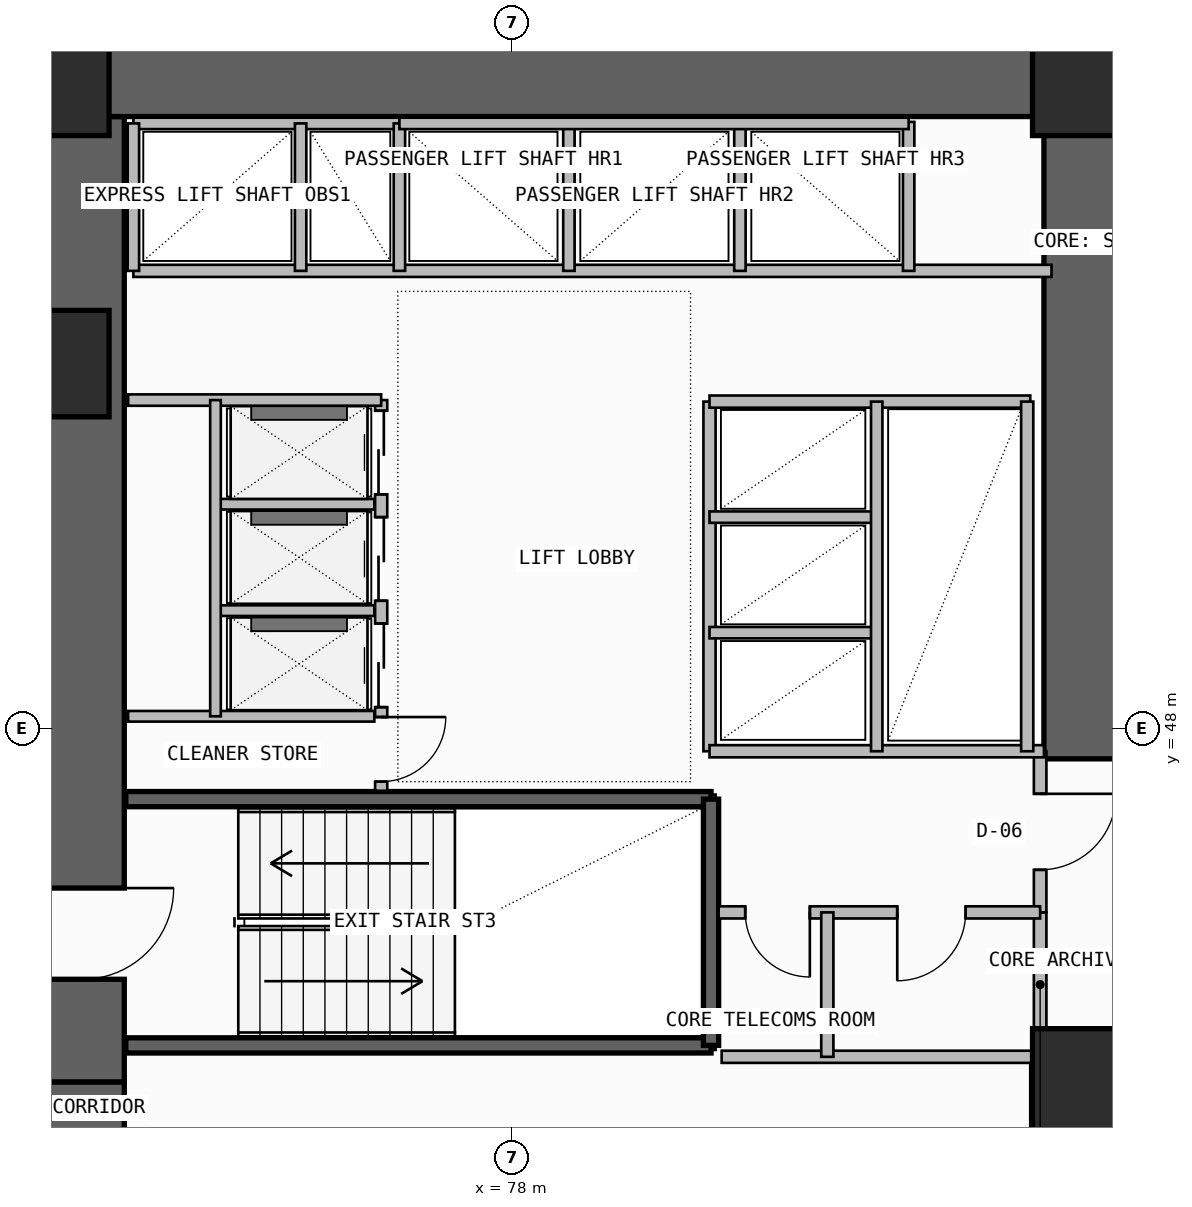
"""IFC4 building model, lengths in metres.
Left out: names, types, materials, properties, quantities, classifications, styles, units other than length and angle.
Written with IfcOpenShell. Run it as: python <this file> out.ifc"""

import sys

from ifc_helpers import new_model, si_unit, direction, frame, frame_2d, origin, origin_2d, place, context, subcontext, project, spatial, rectangle, extrude, element, fill, save


model = new_model("IFC4")
c1 = context("Model", 3, precision=1e-05, world=origin(), true_north=direction((0.0, 1.0)))
c2 = subcontext(c1, "Body", "Model", "MODEL_VIEW")
j1 = project(units=[si_unit("LENGTHUNIT", "METRE"), si_unit("PLANEANGLEUNIT", "RADIAN")], contexts=[c1])
p1 = place(None, origin())
s1 = spatial("IfcSite", under=j1, at=p1, CompositionType="ELEMENT")
p2 = place(p1, origin())
s2 = spatial("IfcBuilding", under=s1, at=p2, CompositionType="ELEMENT")
p3 = place(p2, frame((0.0, 0.0, 74.1)))
s3 = spatial("IfcBuildingStorey", under=s2, at=p3, CompositionType="ELEMENT", Elevation=74.1)
p4 = place(p3, frame((72.35, 35.5, -0.26), z_axis=(0.0, 0.0, 1.0), x_axis=(0.0, 1.0, 0.0)))
e1 = element("IfcWall", 1, at=p4, inside=s3, PredefinedType="SHEAR", context=c2, shape_type="SweptSolid", body=[
    extrude(rectangle(XDim=7.85, YDim=1.1, at=frame_2d((3.925, 0.0))), origin(), (0.0, 0.0, 1.0), 3.6),
])
p5 = place(p4, frame((1.45, 0.0, 0.26)))
e2 = element("IfcOpeningElement", 2, at=p5, cuts=e1, PredefinedType="OPENING", context=c2, shape_type="SweptSolid", body=[
    extrude(rectangle(XDim=1.2, YDim=2.2, at=frame_2d((0.6, 1.1))), frame((0.0, 0.56, 0.0), z_axis=(0.0, -1.0, 0.0), x_axis=(1.0, 0.0, 0.0)), (0.0, 0.0, 1.0), 1.12),
])
p6 = place(p3, frame((72.35, 43.35, -0.26), z_axis=(0.0, 0.0, 1.0), x_axis=(0.0, 1.0, 0.0)))
e3 = element("IfcWall", 3, at=p6, inside=s3, PredefinedType="SHEAR", context=c2, shape_type="SweptSolid", body=[
    extrude(rectangle(XDim=12.7, YDim=1.1, at=frame_2d((6.35, 0.0))), origin(), (0.0, 0.0, 1.0), 3.6),
])
p7 = place(p6, frame((1.35, 0.0, 0.26)))
e4 = element("IfcOpeningElement", 4, at=p7, cuts=e3, PredefinedType="OPENING", context=c2, shape_type="SweptSolid", body=[
    extrude(rectangle(XDim=1.2, YDim=2.2, at=frame_2d((0.6, 1.1))), frame((0.0, 0.56, 0.0), z_axis=(0.0, -1.0, 0.0), x_axis=(1.0, 0.0, 0.0)), (0.0, 0.0, 1.0), 1.12),
])
p8 = place(p3, frame((71.8, 56.6, -0.26), z_axis=(0.0, 0.0, 1.0), x_axis=(1.0, 0.0, 0.0)))
e5 = element("IfcWall", 5, at=p8, inside=s3, PredefinedType="SHEAR", context=c2, shape_type="SweptSolid", body=[
    extrude(rectangle(XDim=14.3, YDim=1.1, at=frame_2d((7.15, 0.0))), origin(), (0.0, 0.0, 1.0), 3.6),
])
p9 = place(p3, frame((85.55, 47.6, -0.26), z_axis=(0.0, 0.0, 1.0), x_axis=(0.0, 1.0, 0.0)))
e6 = element("IfcWall", 6, at=p9, inside=s3, PredefinedType="SHEAR", context=c2, shape_type="SweptSolid", body=[
    extrude(rectangle(XDim=8.45, YDim=1.1, at=frame_2d((4.225, 0.0))), origin(), (0.0, 0.0, 1.0), 3.6),
])
for number, where, z_axis, x_axis in (
    (7, (85.55, 43.35, 0.0), (0.0, 0.0, 1.0), (1.0, 0.0, 0.0)),
    (8, (72.0, 52.8, 0.0), (0.0, 0.0, 1.0), (1.0, 0.0, 0.0)),
    (9, (72.0, 56.5, 0.0), (0.0, 0.0, 1.0), (1.0, 0.0, 0.0)),
    (10, (85.55, 56.5, 0.0), (0.0, 0.0, 1.0), (1.0, 0.0, 0.0)),
):
    element("IfcColumn", number, at=place(p3, frame(where, z_axis=z_axis, x_axis=x_axis)), inside=s3, PredefinedType="COLUMN", context=c2, shape_type="SweptSolid", body=[
        extrude(rectangle(XDim=1.4, YDim=1.4, at=origin_2d()), origin(), (0.0, 0.0, 1.0), 3.6),
    ])
p10 = place(p3, frame((84.92, 38.85, 0.0), z_axis=(0.0, 0.0, 1.0), x_axis=(0.0, 1.0, 0.0)))
e11 = element("IfcWall", 11, at=p10, inside=s3, PredefinedType="SOLIDWALL", context=c2, shape_type="SweptSolid", body=[
    extrude(rectangle(XDim=4.83, YDim=0.2, at=frame_2d((2.415, 0.0))), origin(), (0.0, 0.0, 1.0), 3.34),
])
p11 = place(p10, frame((1.25, 0.0, 0.0)))
e12 = element("IfcOpeningElement", 12, at=p11, cuts=e11, PredefinedType="OPENING", context=c2, shape_type="SweptSolid", body=[
    extrude(rectangle(XDim=1.1, YDim=2.2, at=frame_2d((0.55, 1.1))), frame((0.0, 0.11, 0.0), z_axis=(0.0, -1.0, 0.0), x_axis=(1.0, 0.0, 0.0)), (0.0, 0.0, 1.0), 0.22),
])
for number, where, z_axis, x_axis in (
    (13, (72.92, 43.83, -0.26), (0.0, 0.0, 1.0), (1.0, 0.0, 0.0)),
    (14, (72.92, 47.07, -0.26), (0.0, 0.0, 1.0), (1.0, 0.0, 0.0)),
):
    element("IfcWall", number, at=place(p3, frame(where, z_axis=z_axis, x_axis=x_axis)), inside=s3, PredefinedType="SOLIDWALL", context=c2, shape_type="SweptSolid", body=[
        extrude(rectangle(XDim=7.7, YDim=0.2, at=frame_2d((3.85, 0.0))), origin(), (0.0, 0.0, 1.0), 3.6),
    ])
p12 = place(p3, frame((80.62, 43.83, -0.26), z_axis=(0.0, 0.0, 1.0), x_axis=(0.0, 1.0, 0.0)))
e15 = element("IfcWall", 15, at=p12, inside=s3, PredefinedType="SOLIDWALL", context=c2, shape_type="SweptSolid", body=[
    extrude(rectangle(XDim=3.24, YDim=0.2, at=frame_2d((1.62, 0.0))), origin(), (0.0, 0.0, 1.0), 3.6),
])
p13 = place(p3, frame((84.95, 43.68, 0.0), z_axis=(0.0, 0.0, 1.0), x_axis=(0.0, 1.0, 0.0)))
e16 = element("IfcWall", 16, at=p13, inside=s3, PredefinedType="PLUMBINGWALL", context=c2, shape_type="SweptSolid", body=[
    extrude(rectangle(XDim=1.9, YDim=0.165, at=frame_2d((0.95, 0.0))), origin(), (0.0, 0.0, 1.0), 3.34),
])
p14 = place(p3, frame((84.95, 45.58, 0.0), z_axis=(0.0, 0.0, 1.0), x_axis=(0.0, 1.0, 0.0)))
e17 = element("IfcWall", 17, at=p14, inside=s3, PredefinedType="PARTITIONING", context=c2, shape_type="SweptSolid", body=[
    extrude(rectangle(XDim=2.12, YDim=0.165, at=frame_2d((1.06, 0.0))), origin(), (0.0, 0.0, 1.0), 3.34),
])
p15 = place(p14, frame((0.56, 0.0, 0.0)))
e18 = element("IfcOpeningElement", 18, at=p15, cuts=e17, PredefinedType="OPENING", context=c2, shape_type="SweptSolid", body=[
    extrude(rectangle(XDim=1.0, YDim=2.2, at=frame_2d((0.5, 1.1))), frame((0.0, 0.093, 0.0), z_axis=(0.0, -1.0, 0.0), x_axis=(1.0, 0.0, 0.0)), (0.0, 0.0, 1.0), 0.185),
])
p16 = place(p3, frame((80.72, 45.58, 0.0), z_axis=(0.0, 0.0, 1.0), x_axis=(1.0, 0.0, 0.0)))
e19 = element("IfcWall", 19, at=p16, inside=s3, PredefinedType="PLUMBINGWALL", context=c2, shape_type="SweptSolid", body=[
    extrude(rectangle(XDim=4.23, YDim=0.16, at=frame_2d((2.115, 0.0))), origin(), (0.0, 0.0, 1.0), 3.34),
])
p17 = place(p16, frame((0.35, 0.0, 0.0)))
e20 = element("IfcOpeningElement", 20, at=p17, cuts=e19, PredefinedType="OPENING", context=c2, shape_type="SweptSolid", body=[
    extrude(rectangle(XDim=0.85, YDim=2.05, at=frame_2d((0.425, 1.025))), frame((0.0, 0.09, 0.0), z_axis=(0.0, -1.0, 0.0), x_axis=(1.0, 0.0, 0.0)), (0.0, 0.0, 1.0), 0.18),
])
p18 = place(p16, frame((2.35, 0.0, 0.0)))
e21 = element("IfcOpeningElement", 21, at=p18, cuts=e19, PredefinedType="OPENING", context=c2, shape_type="SweptSolid", body=[
    extrude(rectangle(XDim=0.9, YDim=2.1, at=frame_2d((0.45, 1.05))), frame((0.0, 0.09, 0.0), z_axis=(0.0, -1.0, 0.0), x_axis=(1.0, 0.0, 0.0)), (0.0, 0.0, 1.0), 0.18),
])
p19 = place(p3, frame((80.76, 43.68, 0.0), z_axis=(0.0, 0.0, 1.0), x_axis=(1.0, 0.0, 0.0)))
e22 = element("IfcWall", 22, at=p19, inside=s3, PredefinedType="PLUMBINGWALL", context=c2, shape_type="SweptSolid", body=[
    extrude(rectangle(XDim=4.19, YDim=0.16, at=frame_2d((2.095, 0.0))), origin(), (0.0, 0.0, 1.0), 3.34),
])
p20 = place(p3, frame((82.15, 43.68, 0.0), z_axis=(0.0, 0.0, 1.0), x_axis=(0.0, 1.0, 0.0)))
e23 = element("IfcWall", 23, at=p20, inside=s3, PredefinedType="PLUMBINGWALL", context=c2, shape_type="SweptSolid", body=[
    extrude(rectangle(XDim=1.9, YDim=0.16, at=frame_2d((0.95, 0.0))), origin(), (0.0, 0.0, 1.0), 3.34),
])
p21 = place(p3, frame((76.28, 47.18, 0.0), z_axis=(0.0, 0.0, 1.0), x_axis=(0.0, 1.0, 0.0)))
e24 = element("IfcWall", 24, at=p21, inside=s3, PredefinedType="SOLIDWALL", context=c2, shape_type="SweptSolid", body=[
    extrude(rectangle(XDim=5.14, YDim=0.16, at=frame_2d((2.57, 0.0))), origin(), (0.0, 0.0, 1.0), 3.34),
])
p22 = place(p21, frame((1.1, 0.0, 0.0)))
e25 = element("IfcOpeningElement", 25, at=p22, cuts=e24, PredefinedType="OPENING", context=c2, shape_type="SweptSolid", body=[
    extrude(rectangle(XDim=1.1, YDim=2.25, at=frame_2d((0.55, 1.125))), frame((0.0, 0.09, 0.0), z_axis=(0.0, -1.0, 0.0), x_axis=(1.0, 0.0, 0.0)), (0.0, 0.0, 1.0), 0.18),
])
p23 = place(p21, frame((2.5, 0.0, 0.0)))
e26 = element("IfcOpeningElement", 26, at=p23, cuts=e24, PredefinedType="OPENING", context=c2, shape_type="SweptSolid", body=[
    extrude(rectangle(XDim=1.1, YDim=2.25, at=frame_2d((0.55, 1.125))), frame((0.0, 0.09, 0.0), z_axis=(0.0, -1.0, 0.0), x_axis=(1.0, 0.0, 0.0)), (0.0, 0.0, 1.0), 0.18),
])
p24 = place(p21, frame((3.9, 0.0, 0.0)))
e27 = element("IfcOpeningElement", 27, at=p24, cuts=e24, PredefinedType="OPENING", context=c2, shape_type="SweptSolid", body=[
    extrude(rectangle(XDim=1.1, YDim=2.25, at=frame_2d((0.55, 1.125))), frame((0.0, 0.09, 0.0), z_axis=(0.0, -1.0, 0.0), x_axis=(1.0, 0.0, 0.0)), (0.0, 0.0, 1.0), 0.18),
])
p25 = place(p21, frame((0.12, 0.0, 0.0)))
e28 = element("IfcOpeningElement", 28, at=p25, cuts=e24, PredefinedType="OPENING", context=c2, shape_type="SweptSolid", body=[
    extrude(rectangle(XDim=0.85, YDim=2.05, at=frame_2d((0.425, 1.025))), frame((0.0, 0.09, 0.0), z_axis=(0.0, -1.0, 0.0), x_axis=(1.0, 0.0, 0.0)), (0.0, 0.0, 1.0), 0.18),
])
p26 = place(p3, frame((72.95, 52.32, 0.0), z_axis=(0.0, 0.0, 1.0), x_axis=(1.0, 0.0, 0.0)))
e29 = element("IfcWall", 29, at=p26, inside=s3, PredefinedType="SOLIDWALL", context=c2, shape_type="SweptSolid", body=[
    extrude(rectangle(XDim=3.33, YDim=0.15, at=frame_2d((1.665, 0.0))), origin(), (0.0, 0.0, 1.0), 3.34),
])
p27 = place(p3, frame((72.95, 48.16, 0.0), z_axis=(0.0, 0.0, 1.0), x_axis=(1.0, 0.0, 0.0)))
e30 = element("IfcWall", 30, at=p27, inside=s3, PredefinedType="PLUMBINGWALL", context=c2, shape_type="SweptSolid", body=[
    extrude(rectangle(XDim=3.24, YDim=0.14, at=frame_2d((1.62, 0.0))), origin(), (0.0, 0.0, 1.0), 3.34),
])
for number, where, z_axis, x_axis in (
    (31, (74.15, 49.55, 0.0), (0.0, 0.0, 1.0), (1.0, 0.0, 0.0)),
    (32, (74.15, 50.95, 0.0), (0.0, 0.0, 1.0), (1.0, 0.0, 0.0)),
):
    element("IfcWall", number, at=place(p3, frame(where, z_axis=z_axis, x_axis=x_axis)), inside=s3, PredefinedType="PLUMBINGWALL", context=c2, shape_type="SweptSolid", body=[
        extrude(rectangle(XDim=2.04, YDim=0.14, at=frame_2d((1.02, 0.0))), origin(), (0.0, 0.0, 1.0), 3.34),
    ])
p28 = place(p3, frame((74.1, 48.16, 0.0), z_axis=(0.0, 0.0, 1.0), x_axis=(0.0, 1.0, 0.0)))
e33 = element("IfcWall", 33, at=p28, inside=s3, PredefinedType="PLUMBINGWALL", context=c2, shape_type="SweptSolid", body=[
    extrude(rectangle(XDim=4.16, YDim=0.14, at=frame_2d((2.08, 0.0))), origin(), (0.0, 0.0, 1.0), 3.34),
])
p29 = place(p3, frame((80.6, 47.7, 0.0), z_axis=(0.0, 0.0, 1.0), x_axis=(0.0, 1.0, 0.0)))
e34 = element("IfcWall", 34, at=p29, inside=s3, PredefinedType="SOLIDWALL", context=c2, shape_type="SweptSolid", body=[
    extrude(rectangle(XDim=4.6, YDim=0.16, at=frame_2d((2.3, 0.0))), origin(), (0.0, 0.0, 1.0), 3.34),
])
p30 = place(p3, frame((80.6, 47.7, 0.0), z_axis=(0.0, 0.0, 1.0), x_axis=(1.0, 0.0, 0.0)))
e35 = element("IfcWall", 35, at=p30, inside=s3, PredefinedType="SOLIDWALL", context=c2, shape_type="SweptSolid", body=[
    extrude(rectangle(XDim=4.4, YDim=0.16, at=frame_2d((2.2, 0.0))), origin(), (0.0, 0.0, 1.0), 3.34),
])
p31 = place(p3, frame((80.6, 52.3, 0.0), z_axis=(0.0, 0.0, 1.0), x_axis=(1.0, 0.0, 0.0)))
e36 = element("IfcWall", 36, at=p31, inside=s3, PredefinedType="SOLIDWALL", context=c2, shape_type="SweptSolid", body=[
    extrude(rectangle(XDim=4.22, YDim=0.16, at=frame_2d((2.11, 0.0))), origin(), (0.0, 0.0, 1.0), 3.34),
])
for number, where, z_axis, x_axis in (
    (37, (80.6, 49.26, 0.0), (0.0, 0.0, 1.0), (1.0, 0.0, 0.0)),
    (38, (80.6, 50.78, 0.0), (0.0, 0.0, 1.0), (1.0, 0.0, 0.0)),
):
    element("IfcWall", number, at=place(p3, frame(where, z_axis=z_axis, x_axis=x_axis)), inside=s3, PredefinedType="PLUMBINGWALL", context=c2, shape_type="SweptSolid", body=[
        extrude(rectangle(XDim=2.2, YDim=0.15, at=frame_2d((1.1, 0.0))), origin(), (0.0, 0.0, 1.0), 3.34),
    ])
p32 = place(p3, frame((82.8, 47.7, 0.0), z_axis=(0.0, 0.0, 1.0), x_axis=(0.0, 1.0, 0.0)))
e39 = element("IfcWall", 39, at=p32, inside=s3, PredefinedType="PLUMBINGWALL", context=c2, shape_type="SweptSolid", body=[
    extrude(rectangle(XDim=4.6, YDim=0.15, at=frame_2d((2.3, 0.0))), origin(), (0.0, 0.0, 1.0), 3.34),
])
p33 = place(p3, frame((84.78, 47.7, 0.0), z_axis=(0.0, 0.0, 1.0), x_axis=(0.0, 1.0, 0.0)))
e40 = element("IfcWall", 40, at=p33, inside=s3, PredefinedType="SOLIDWALL", context=c2, shape_type="SweptSolid", body=[
    extrude(rectangle(XDim=4.6, YDim=0.16, at=frame_2d((2.3, 0.0))), origin(), (0.0, 0.0, 1.0), 3.34),
])
p34 = place(p3, frame((73.02, 54.02, 0.0), z_axis=(0.0, 0.0, 1.0), x_axis=(1.0, 0.0, 0.0)))
e41 = element("IfcWall", 41, at=p34, inside=s3, PredefinedType="SOLIDWALL", context=c2, shape_type="SweptSolid", body=[
    extrude(rectangle(XDim=12.08, YDim=0.16, at=frame_2d((6.04, 0.0))), origin(), (0.0, 0.0, 1.0), 3.34),
])
p35 = place(p3, frame((73.02, 55.96, 0.0), z_axis=(0.0, 0.0, 1.0), x_axis=(1.0, 0.0, 0.0)))
e42 = element("IfcWall", 42, at=p35, inside=s3, PredefinedType="SOLIDWALL", context=c2, shape_type="SweptSolid", body=[
    extrude(rectangle(XDim=3.5, YDim=0.15, at=frame_2d((1.75, 0.0))), origin(), (0.0, 0.0, 1.0), 3.34),
])
p36 = place(p3, frame((73.02, 54.02, 0.0), z_axis=(0.0, 0.0, 1.0), x_axis=(0.0, 1.0, 0.0)))
e43 = element("IfcWall", 43, at=p36, inside=s3, PredefinedType="PLUMBINGWALL", context=c2, shape_type="SweptSolid", body=[
    extrude(rectangle(XDim=1.94, YDim=0.15, at=frame_2d((0.97, 0.0))), origin(), (0.0, 0.0, 1.0), 3.34),
])
p37 = place(p3, frame((76.52, 54.02, 0.0), z_axis=(0.0, 0.0, 1.0), x_axis=(0.0, 1.0, 0.0)))
e44 = element("IfcWall", 44, at=p37, inside=s3, PredefinedType="SOLIDWALL", context=c2, shape_type="SweptSolid", body=[
    extrude(rectangle(XDim=1.94, YDim=0.15, at=frame_2d((0.97, 0.0))), origin(), (0.0, 0.0, 1.0), 3.34),
])
p38 = place(p3, frame((75.22, 54.02, 0.0), z_axis=(0.0, 0.0, 1.0), x_axis=(0.0, 1.0, 0.0)))
e45 = element("IfcWall", 45, at=p38, inside=s3, PredefinedType="PLUMBINGWALL", context=c2, shape_type="SweptSolid", body=[
    extrude(rectangle(XDim=1.94, YDim=0.15, at=frame_2d((0.97, 0.0))), origin(), (0.0, 0.0, 1.0), 3.34),
])
for number, where, z_axis, x_axis in (
    (46, (78.75, 54.02, 0.0), (0.0, 0.0, 1.0), (0.0, 1.0, 0.0)),
    (47, (81.0, 54.02, 0.0), (0.0, 0.0, 1.0), (0.0, 1.0, 0.0)),
):
    element("IfcWall", number, at=place(p3, frame(where, z_axis=z_axis, x_axis=x_axis)), inside=s3, PredefinedType="PLUMBINGWALL", context=c2, shape_type="SweptSolid", body=[
        extrude(rectangle(XDim=1.96, YDim=0.15, at=frame_2d((0.98, 0.0))), origin(), (0.0, 0.0, 1.0), 3.34),
    ])
p39 = place(p3, frame((83.22, 54.02, 0.0), z_axis=(0.0, 0.0, 1.0), x_axis=(0.0, 1.0, 0.0)))
e48 = element("IfcWall", 48, at=p39, inside=s3, PredefinedType="SOLIDWALL", context=c2, shape_type="SweptSolid", body=[
    extrude(rectangle(XDim=1.96, YDim=0.15, at=frame_2d((0.98, 0.0))), origin(), (0.0, 0.0, 1.0), 3.34),
])
p40 = place(p3, frame((76.52, 55.96, 0.0), z_axis=(0.0, 0.0, 1.0), x_axis=(1.0, 0.0, 0.0)))
e49 = element("IfcWall", 49, at=p40, inside=s3, PredefinedType="SOLIDWALL", context=c2, shape_type="SweptSolid", body=[
    extrude(rectangle(XDim=6.7, YDim=0.15, at=frame_2d((3.35, 0.0))), origin(), (0.0, 0.0, 1.0), 3.34),
])
p41 = place(p7, frame((1.2, 0.0, 0.0), z_axis=(0.0, 0.0, 1.0), x_axis=(-1.0, 0.0, 0.0)))
e50 = element("IfcDoor", 50, at=p41, inside=s3, OperationType="SINGLE_SWING_LEFT", PredefinedType="USERDEFINED", context=c2, shape_type="SweptSolid", body=[
    extrude(rectangle(XDim=1.2, YDim=2.2, at=frame_2d((0.6, 1.1))), frame((0.0, 0.025, 0.0), z_axis=(0.0, -1.0, 0.0), x_axis=(1.0, 0.0, 0.0)), (0.0, 0.0, 1.0), 0.05),
])
fill(e4, e50)
p42 = place(p15, frame((1.0, 0.0, 0.0), z_axis=(0.0, 0.0, 1.0), x_axis=(-1.0, 0.0, 0.0)))
e51 = element("IfcDoor", 51, at=p42, inside=s3, OperationType="SINGLE_SWING_LEFT", PredefinedType="DOOR", context=c2, shape_type="SweptSolid", body=[
    extrude(rectangle(XDim=1.0, YDim=2.2, at=frame_2d((0.5, 1.1))), frame((0.0, 0.025, 0.0), z_axis=(0.0, -1.0, 0.0), x_axis=(1.0, 0.0, 0.0)), (0.0, 0.0, 1.0), 0.05),
])
fill(e18, e51)
p43 = place(p17, frame((0.85, 0.0, 0.0), z_axis=(0.0, 0.0, 1.0), x_axis=(-1.0, 0.0, 0.0)))
e52 = element("IfcDoor", 52, at=p43, inside=s3, OperationType="SINGLE_SWING_LEFT", PredefinedType="DOOR", context=c2, shape_type="SweptSolid", body=[
    extrude(rectangle(XDim=0.85, YDim=2.05, at=frame_2d((0.425, 1.025))), frame((0.0, 0.025, 0.0), z_axis=(0.0, -1.0, 0.0), x_axis=(1.0, 0.0, 0.0)), (0.0, 0.0, 1.0), 0.05),
])
fill(e20, e52)
p44 = place(p18, frame((0.9, 0.0, 0.0), z_axis=(0.0, 0.0, 1.0), x_axis=(-1.0, 0.0, 0.0)))
e53 = element("IfcDoor", 53, at=p44, inside=s3, OperationType="SINGLE_SWING_RIGHT", PredefinedType="DOOR", context=c2, shape_type="SweptSolid", body=[
    extrude(rectangle(XDim=0.9, YDim=2.1, at=frame_2d((0.45, 1.05))), frame((0.0, 0.025, 0.0), z_axis=(0.0, -1.0, 0.0), x_axis=(1.0, 0.0, 0.0)), (0.0, 0.0, 1.0), 0.05),
])
fill(e21, e53)
p45 = place(p22, origin())
e54 = element("IfcDoor", 54, at=p45, inside=s3, OperationType="DOUBLE_DOOR_SLIDING", PredefinedType="DOOR", context=c2, shape_type="SweptSolid", body=[
    extrude(rectangle(XDim=1.1, YDim=2.25, at=frame_2d((0.55, 1.125))), frame((0.0, 0.025, 0.0), z_axis=(0.0, -1.0, 0.0), x_axis=(1.0, 0.0, 0.0)), (0.0, 0.0, 1.0), 0.05),
])
fill(e25, e54)
p46 = place(p23, origin())
e55 = element("IfcDoor", 55, at=p46, inside=s3, OperationType="DOUBLE_DOOR_SLIDING", PredefinedType="DOOR", context=c2, shape_type="SweptSolid", body=[
    extrude(rectangle(XDim=1.1, YDim=2.25, at=frame_2d((0.55, 1.125))), frame((0.0, 0.025, 0.0), z_axis=(0.0, -1.0, 0.0), x_axis=(1.0, 0.0, 0.0)), (0.0, 0.0, 1.0), 0.05),
])
fill(e26, e55)
p47 = place(p24, origin())
e56 = element("IfcDoor", 56, at=p47, inside=s3, OperationType="DOUBLE_DOOR_SLIDING", PredefinedType="DOOR", context=c2, shape_type="SweptSolid", body=[
    extrude(rectangle(XDim=1.1, YDim=2.25, at=frame_2d((0.55, 1.125))), frame((0.0, 0.025, 0.0), z_axis=(0.0, -1.0, 0.0), x_axis=(1.0, 0.0, 0.0)), (0.0, 0.0, 1.0), 0.05),
])
fill(e27, e56)
p48 = place(p25, frame((0.85, 0.0, 0.0), z_axis=(0.0, 0.0, 1.0), x_axis=(-1.0, 0.0, 0.0)))
e57 = element("IfcDoor", 57, at=p48, inside=s3, OperationType="SINGLE_SWING_LEFT", PredefinedType="DOOR", context=c2, shape_type="SweptSolid", body=[
    extrude(rectangle(XDim=0.85, YDim=2.05, at=frame_2d((0.425, 1.025))), frame((0.0, 0.025, 0.0), z_axis=(0.0, -1.0, 0.0), x_axis=(1.0, 0.0, 0.0)), (0.0, 0.0, 1.0), 0.05),
])
fill(e28, e57)
save(model, sys.argv[1])
